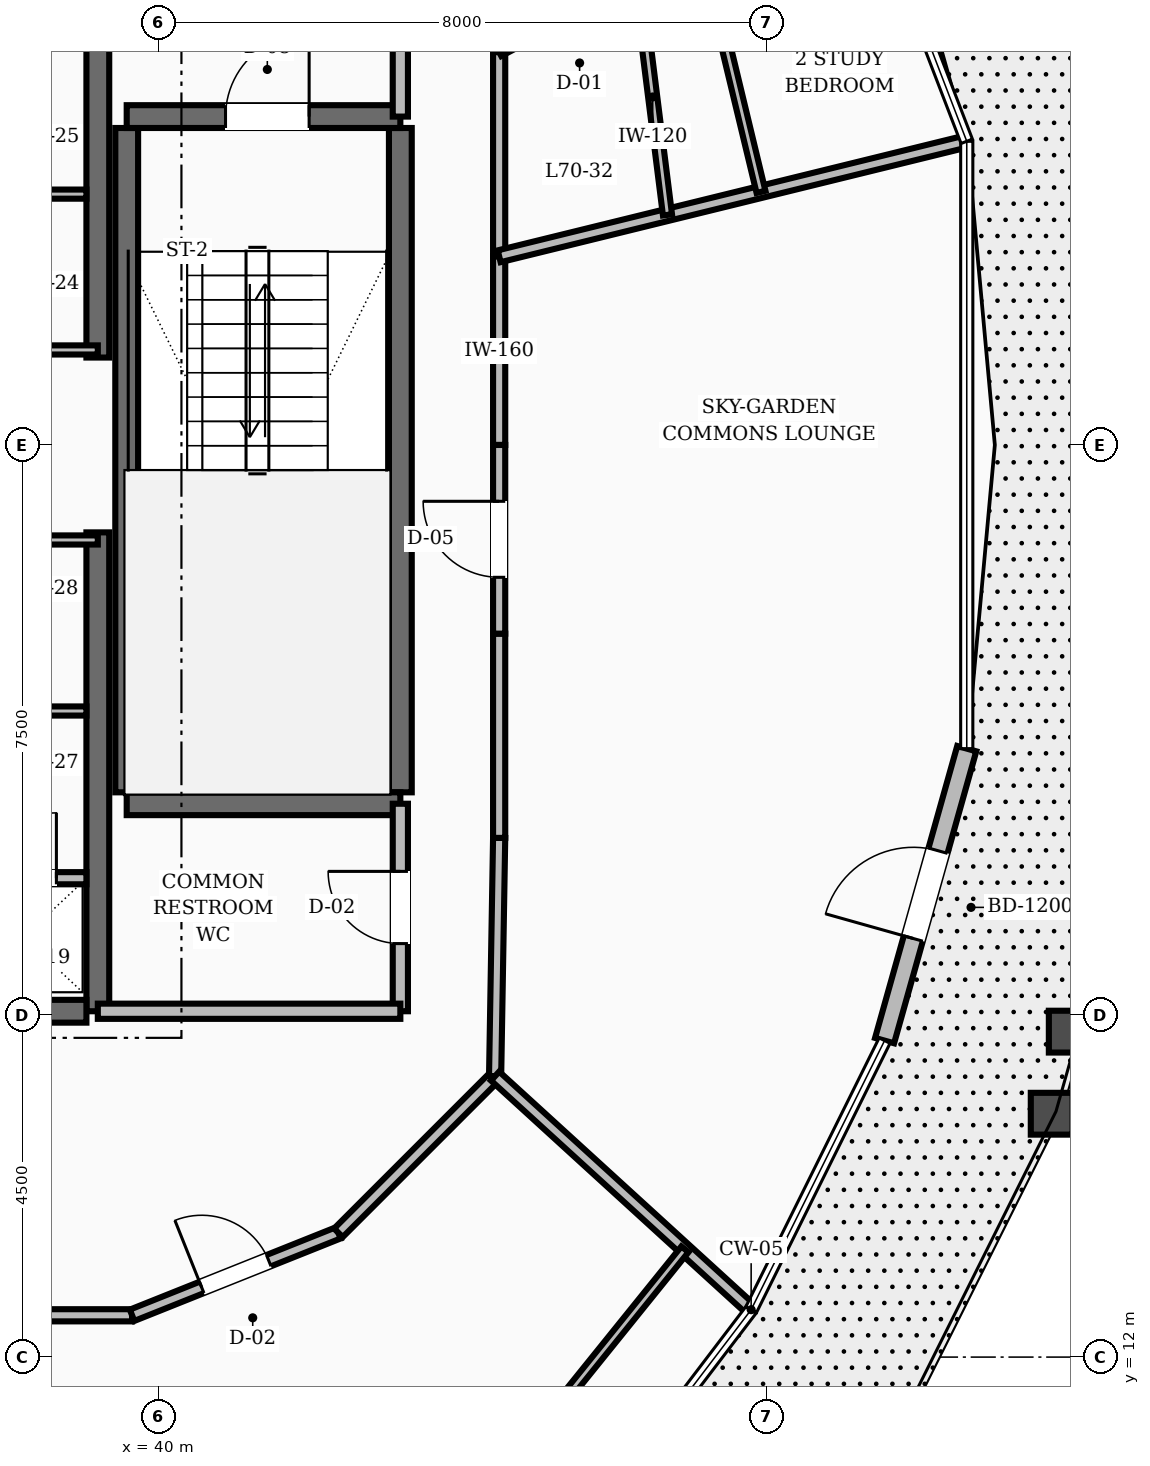
"""IFC4 building model, lengths in metres.
Left out: names, types, materials, properties, quantities, classifications, styles, units other than length and angle.
Written with IfcOpenShell. Run it as: python <this file> out.ifc"""

import sys

from ifc_helpers import new_model, si_unit, direction, frame, frame_2d, origin, place, context, subcontext, project, spatial, rectangle, extrude, element, fill, save


model = new_model("IFC4")
c1 = context("Model", 3, precision=1e-05, world=origin(), true_north=direction((0.0, 1.0)))
c2 = subcontext(c1, "Body", "Model", "MODEL_VIEW")
j1 = project(units=[si_unit("LENGTHUNIT", "METRE"), si_unit("PLANEANGLEUNIT", "RADIAN")], contexts=[c1])
p1 = place(None, origin())
s1 = spatial("IfcSite", under=j1, at=p1, CompositionType="ELEMENT")
p2 = place(p1, origin())
s2 = spatial("IfcBuilding", under=s1, at=p2, CompositionType="ELEMENT")
p3 = place(p2, frame((0.0, 0.0, 268.8)))
s3 = spatial("IfcBuildingStorey", under=s2, at=p3, CompositionType="ELEMENT", Elevation=268.8)
for number, where, z_axis, x_axis in (
    (1, (39.2, 16.55, 0.0), (0.0, 0.0, 1.0), (0.0, 1.0, 0.0)),
    (2, (39.2, 25.15, 0.0), (0.0, 0.0, 1.0), (0.0, 1.0, 0.0)),
):
    element("IfcWall", number, at=place(p3, frame(where, z_axis=z_axis, x_axis=x_axis)), inside=s3, PredefinedType="SHEAR", context=c2, shape_type="SweptSolid", body=[
        extrude(rectangle(XDim=6.3, YDim=0.3, at=frame_2d((3.15, 0.0))), origin(), (0.0, 0.0, 1.0), 3.6),
    ])
p4 = place(p3, frame((35.8, 16.55, 0.0), z_axis=(0.0, 0.0, 1.0), x_axis=(1.0, 0.0, 0.0)))
e3 = element("IfcWall", 3, at=p4, inside=s3, PredefinedType="SHEAR", context=c2, shape_type="SweptSolid", body=[
    extrude(rectangle(XDim=3.25, YDim=0.3, at=frame_2d((1.625, 0.0))), origin(), (0.0, 0.0, 1.0), 3.6),
])
p5 = place(p4, frame((0.3, 0.0, 0.0)))
e4 = element("IfcOpeningElement", 4, at=p5, cuts=e3, PredefinedType="OPENING", context=c2, shape_type="SweptSolid", body=[
    extrude(rectangle(XDim=1.1, YDim=2.1, at=frame_2d((0.55, 1.05))), frame((0.0, 0.16, 0.0), z_axis=(0.0, -1.0, 0.0), x_axis=(1.0, 0.0, 0.0)), (0.0, 0.0, 1.0), 0.32),
])
for number, where, z_axis, x_axis in (
    (5, (43.18, 19.43, 0.0), (0.0, 0.0, 1.0), (0.0, 1.0, 0.0)),
    (6, (39.58, 19.43, 0.0), (0.0, 0.0, 1.0), (0.0, 1.0, 0.0)),
):
    element("IfcWall", number, at=place(p3, frame(where, z_axis=z_axis, x_axis=x_axis)), inside=s3, PredefinedType="SHEAR", context=c2, shape_type="SweptSolid", body=[
        extrude(rectangle(XDim=8.74, YDim=0.3, at=frame_2d((4.37, 0.0))), origin(), (0.0, 0.0, 1.0), 3.6),
    ])
p6 = place(p3, frame((39.58, 19.28, 0.0), z_axis=(0.0, 0.0, 1.0), x_axis=(1.0, 0.0, 0.0)))
e7 = element("IfcWall", 7, at=p6, inside=s3, PredefinedType="SHEAR", context=c2, shape_type="SweptSolid", body=[
    extrude(rectangle(XDim=3.6, YDim=0.3, at=frame_2d((1.8, 0.0))), origin(), (0.0, 0.0, 1.0), 3.6),
])
p7 = place(p3, frame((39.58, 28.32, 0.0), z_axis=(0.0, 0.0, 1.0), x_axis=(1.0, 0.0, 0.0)))
e8 = element("IfcWall", 8, at=p7, inside=s3, PredefinedType="SHEAR", context=c2, shape_type="SweptSolid", body=[
    extrude(rectangle(XDim=3.6, YDim=0.3, at=frame_2d((1.8, 0.0))), origin(), (0.0, 0.0, 1.0), 3.6),
])
p8 = place(p7, frame((1.3, 0.0, 0.0)))
e9 = element("IfcOpeningElement", 9, at=p8, cuts=e8, PredefinedType="OPENING", context=c2, shape_type="SweptSolid", body=[
    extrude(rectangle(XDim=1.1, YDim=2.1, at=frame_2d((0.55, 1.05))), frame((0.0, 0.16, 0.0), z_axis=(0.0, -1.0, 0.0), x_axis=(1.0, 0.0, 0.0)), (0.0, 0.0, 1.0), 0.32),
])
p9 = place(p3, frame((49.551, 16.164, 0.0), z_axis=(0.0, 0.0, 1.0), x_axis=(0.270905028763, 0.962606080072, 0.0)))
e10 = element("IfcWall", 10, at=p9, inside=s3, PredefinedType="STANDARD", context=c2, shape_type="SweptSolid", body=[
    extrude(rectangle(XDim=3.99, YDim=0.26, at=frame_2d((1.995, 0.0))), origin(), (0.0, 0.0, 1.0), 2.88),
])
p10 = place(p9, frame((1.395, 0.0, 0.0)))
e11 = element("IfcOpeningElement", 11, at=p10, cuts=e10, PredefinedType="OPENING", context=c2, shape_type="SweptSolid", body=[
    extrude(rectangle(XDim=1.2, YDim=2.15, at=frame_2d((0.6, 1.075))), frame((0.0, 0.14, 0.0), z_axis=(0.0, -1.0, 0.0), x_axis=(1.0, 0.0, 0.0)), (0.0, 0.0, 1.0), 0.28),
])
p11 = place(p3, frame((43.18, 28.32, 0.0), z_axis=(0.0, 0.0, 1.0), x_axis=(0.0, 1.0, 0.0)))
e12 = element("IfcWall", 12, at=p11, inside=s3, PredefinedType="SOLIDWALL", context=c2, shape_type="SweptSolid", body=[
    extrude(rectangle(XDim=3.13, YDim=0.2, at=frame_2d((1.565, 0.0))), origin(), (0.0, 0.0, 1.0), 2.87),
])
p12 = place(p11, frame((1.015, 0.0, 0.0)))
e13 = element("IfcOpeningElement", 13, at=p12, cuts=e12, PredefinedType="OPENING", context=c2, shape_type="SweptSolid", body=[
    extrude(rectangle(XDim=1.1, YDim=2.1, at=frame_2d((0.55, 1.05))), frame((0.0, 0.11, 0.0), z_axis=(0.0, -1.0, 0.0), x_axis=(1.0, 0.0, 0.0)), (0.0, 0.0, 1.0), 0.22),
])
p13 = place(p3, frame((43.18, 16.55, 0.0), z_axis=(0.0, 0.0, 1.0), x_axis=(0.0, 1.0, 0.0)))
e14 = element("IfcWall", 14, at=p13, inside=s3, PredefinedType="SOLIDWALL", context=c2, shape_type="SweptSolid", body=[
    extrude(rectangle(XDim=2.73, YDim=0.2, at=frame_2d((1.365, 0.0))), origin(), (0.0, 0.0, 1.0), 2.87),
])
p14 = place(p13, frame((0.89, 0.0, 0.0)))
e15 = element("IfcOpeningElement", 15, at=p14, cuts=e14, PredefinedType="OPENING", context=c2, shape_type="SweptSolid", body=[
    extrude(rectangle(XDim=0.95, YDim=2.1, at=frame_2d((0.475, 1.05))), frame((0.0, 0.11, 0.0), z_axis=(0.0, -1.0, 0.0), x_axis=(1.0, 0.0, 0.0)), (0.0, 0.0, 1.0), 0.22),
])
p15 = place(p3, frame((39.2, 16.55, 0.0), z_axis=(0.0, 0.0, 1.0), x_axis=(1.0, 0.0, 0.0)))
e16 = element("IfcWall", 16, at=p15, inside=s3, PredefinedType="SOLIDWALL", context=c2, shape_type="SweptSolid", body=[
    extrude(rectangle(XDim=3.98, YDim=0.2, at=frame_2d((1.99, 0.0))), origin(), (0.0, 0.0, 1.0), 2.87),
])
p16 = place(p3, frame((37.4, 18.3, 0.0), z_axis=(0.0, 0.0, 1.0), x_axis=(1.0, 0.0, 0.0)))
e17 = element("IfcWall", 17, at=p16, inside=s3, PredefinedType="SOLIDWALL", context=c2, shape_type="SweptSolid", body=[
    extrude(rectangle(XDim=1.65, YDim=0.16, at=frame_2d((0.825, 0.0))), origin(), (0.0, 0.0, 1.0), 2.87),
])
p17 = place(p16, frame((0.395, 0.0, 0.0)))
e18 = element("IfcOpeningElement", 18, at=p17, cuts=e17, PredefinedType="OPENING", context=c2, shape_type="SweptSolid", body=[
    extrude(rectangle(XDim=0.86, YDim=2.1, at=frame_2d((0.43, 1.05))), frame((0.0, 0.09, 0.0), z_axis=(0.0, -1.0, 0.0), x_axis=(1.0, 0.0, 0.0)), (0.0, 0.0, 1.0), 0.18),
])
for number, where, z_axis, x_axis in (
    (19, (37.4, 25.25, 0.0), (0.0, 0.0, 1.0), (1.0, 0.0, 0.0)),
    (20, (37.4, 22.75, 0.0), (0.0, 0.0, 1.0), (1.0, 0.0, 0.0)),
):
    element("IfcWall", number, at=place(p3, frame(where, z_axis=z_axis, x_axis=x_axis)), inside=s3, PredefinedType="PARTITIONING", context=c2, shape_type="SweptSolid", body=[
        extrude(rectangle(XDim=1.8, YDim=0.12, at=frame_2d((0.9, 0.0))), origin(), (0.0, 0.0, 1.0), 2.87),
    ])
for number, where, z_axis, x_axis in (
    (21, (37.4, 27.3, 0.0), (0.0, 0.0, 1.0), (1.0, 0.0, 0.0)),
    (22, (37.4, 20.5, 0.0), (0.0, 0.0, 1.0), (1.0, 0.0, 0.0)),
):
    element("IfcWall", number, at=place(p3, frame(where, z_axis=z_axis, x_axis=x_axis)), inside=s3, PredefinedType="PARTITIONING", context=c2, shape_type="SweptSolid", body=[
        extrude(rectangle(XDim=1.65, YDim=0.12, at=frame_2d((0.825, 0.0))), origin(), (0.0, 0.0, 1.0), 2.87),
    ])
p18 = place(p3, frame((44.48, 24.0, 0.0), z_axis=(0.0, 0.0, 1.0), x_axis=(0.0, 1.0, 0.0)))
e23 = element("IfcWall", 23, at=p18, inside=s3, PredefinedType="SOLIDWALL", context=c2, shape_type="SweptSolid", body=[
    extrude(rectangle(XDim=2.482, YDim=0.16, at=frame_2d((1.241, 0.0))), origin(), (0.0, 0.0, 1.0), 2.87),
])
p19 = place(p3, frame((44.48, 26.482, 0.0), z_axis=(0.0, 0.0, 1.0), x_axis=(0.0, 1.0, 0.0)))
e24 = element("IfcWall", 24, at=p19, inside=s3, PredefinedType="SOLIDWALL", context=c2, shape_type="SweptSolid", body=[
    extrude(rectangle(XDim=2.687, YDim=0.16, at=frame_2d((1.344, 0.0))), origin(), (0.0, 0.0, 1.0), 2.87),
])
p20 = place(p3, frame((44.48, 29.169, 0.0), z_axis=(0.0, 0.0, 1.0), x_axis=(-0.016981035134, 0.999855811828, 0.0)))
e25 = element("IfcWall", 25, at=p20, inside=s3, PredefinedType="SOLIDWALL", context=c2, shape_type="SweptSolid", body=[
    extrude(rectangle(XDim=3.134, YDim=0.16, at=frame_2d((1.567, 0.0))), origin(), (0.0, 0.0, 1.0), 2.87),
])
p21 = place(p20, frame((1.067, 0.0, 0.0)))
e26 = element("IfcOpeningElement", 26, at=p21, cuts=e25, PredefinedType="OPENING", context=c2, shape_type="SweptSolid", body=[
    extrude(rectangle(XDim=1.0, YDim=2.1, at=frame_2d((0.5, 1.05))), frame((0.0, 0.09, 0.0), z_axis=(0.0, -1.0, 0.0), x_axis=(1.0, 0.0, 0.0)), (0.0, 0.0, 1.0), 0.18),
])
p22 = place(p3, frame((36.743, 12.55, 0.0), z_axis=(0.0, 0.0, 1.0), x_axis=(1.0, 0.0, 0.0)))
e27 = element("IfcWall", 27, at=p22, inside=s3, PredefinedType="SOLIDWALL", context=c2, shape_type="SweptSolid", body=[
    extrude(rectangle(XDim=2.908, YDim=0.16, at=frame_2d((1.454, 0.0))), origin(), (0.0, 0.0, 1.0), 2.87),
])
p23 = place(p3, frame((39.651, 12.55, 0.0), z_axis=(0.0, 0.0, 1.0), x_axis=(0.92856882165, 0.371160266542, 0.0)))
e28 = element("IfcWall", 28, at=p23, inside=s3, PredefinedType="SOLIDWALL", context=c2, shape_type="SweptSolid", body=[
    extrude(rectangle(XDim=2.923, YDim=0.16, at=frame_2d((1.461, 0.0))), origin(), (0.0, 0.0, 1.0), 2.87),
])
p24 = place(p23, frame((0.987, 0.0, 0.0)))
e29 = element("IfcOpeningElement", 29, at=p24, cuts=e28, PredefinedType="OPENING", context=c2, shape_type="SweptSolid", body=[
    extrude(rectangle(XDim=0.95, YDim=2.1, at=frame_2d((0.475, 1.05))), frame((0.0, 0.09, 0.0), z_axis=(0.0, -1.0, 0.0), x_axis=(1.0, 0.0, 0.0)), (0.0, 0.0, 1.0), 0.18),
])
p25 = place(p3, frame((42.365, 13.635, 0.0), z_axis=(0.0, 0.0, 1.0), x_axis=(0.707106781187, 0.707106781187, 0.0)))
e30 = element("IfcWall", 30, at=p25, inside=s3, PredefinedType="SOLIDWALL", context=c2, shape_type="SweptSolid", body=[
    extrude(rectangle(XDim=2.916, YDim=0.16, at=frame_2d((1.458, 0.0))), origin(), (0.0, 0.0, 1.0), 2.87),
])
p26 = place(p3, frame((44.427, 15.697, 0.0), z_axis=(0.0, 0.0, 1.0), x_axis=(0.016981035134, 0.999855811828, 0.0)))
e31 = element("IfcWall", 31, at=p26, inside=s3, PredefinedType="SOLIDWALL", context=c2, shape_type="SweptSolid", body=[
    extrude(rectangle(XDim=3.134, YDim=0.16, at=frame_2d((1.567, 0.0))), origin(), (0.0, 0.0, 1.0), 2.87),
])
p27 = place(p3, frame((44.48, 18.831, 0.0), z_axis=(0.0, 0.0, 1.0), x_axis=(0.0, 1.0, 0.0)))
e32 = element("IfcWall", 32, at=p27, inside=s3, PredefinedType="SOLIDWALL", context=c2, shape_type="SweptSolid", body=[
    extrude(rectangle(XDim=2.687, YDim=0.16, at=frame_2d((1.344, 0.0))), origin(), (0.0, 0.0, 1.0), 2.87),
])
p28 = place(p3, frame((44.48, 21.518, 0.0), z_axis=(0.0, 0.0, 1.0), x_axis=(0.0, 1.0, 0.0)))
e33 = element("IfcWall", 33, at=p28, inside=s3, PredefinedType="SOLIDWALL", context=c2, shape_type="SweptSolid", body=[
    extrude(rectangle(XDim=2.482, YDim=0.16, at=frame_2d((1.241, 0.0))), origin(), (0.0, 0.0, 1.0), 2.87),
])
p29 = place(p28, frame((0.741, 0.0, 0.0)))
e34 = element("IfcOpeningElement", 34, at=p29, cuts=e33, PredefinedType="OPENING", context=c2, shape_type="SweptSolid", body=[
    extrude(rectangle(XDim=1.0, YDim=2.1, at=frame_2d((0.5, 1.05))), frame((0.0, 0.09, 0.0), z_axis=(0.0, -1.0, 0.0), x_axis=(1.0, 0.0, 0.0)), (0.0, 0.0, 1.0), 0.18),
])
p30 = place(p3, frame((44.427, 15.697, 0.0), z_axis=(0.0, 0.0, 1.0), x_axis=(0.73873859701, -0.673992051354, 0.0)))
e35 = element("IfcWall", 35, at=p30, inside=s3, PredefinedType="SOLIDWALL", context=c2, shape_type="SweptSolid", body=[
    extrude(rectangle(XDim=4.51, YDim=0.16, at=frame_2d((2.255, 0.0))), origin(), (0.0, 0.0, 1.0), 2.87),
])
p31 = place(p3, frame((44.48, 26.482, 0.0), z_axis=(0.0, 0.0, 1.0), x_axis=(0.971083357224, 0.238740682167, 0.0)))
e36 = element("IfcWall", 36, at=p31, inside=s3, PredefinedType="SOLIDWALL", context=c2, shape_type="SweptSolid", body=[
    extrude(rectangle(XDim=6.285, YDim=0.16, at=frame_2d((3.143, 0.0))), origin(), (0.0, 0.0, 1.0), 2.87),
])
p32 = place(p3, frame((46.695, 27.027, 0.0), z_axis=(0.0, 0.0, 1.0), x_axis=(-0.124457549866, 0.99222493331, 0.0)))
e37 = element("IfcWall", 37, at=p32, inside=s3, PredefinedType="PARTITIONING", context=c2, shape_type="SweptSolid", body=[
    extrude(rectangle(XDim=3.127, YDim=0.12, at=frame_2d((1.563, 0.0))), origin(), (0.0, 0.0, 1.0), 2.87),
])
p33 = place(p3, frame((44.48, 29.169, 0.0), z_axis=(0.0, 0.0, 1.0), x_axis=(0.885077371256, 0.465443924539, 0.0)))
e38 = element("IfcWall", 38, at=p33, inside=s3, PredefinedType="PARTITIONING", context=c2, shape_type="SweptSolid", body=[
    extrude(rectangle(XDim=2.062, YDim=0.12, at=frame_2d((1.031, 0.0))), origin(), (0.0, 0.0, 1.0), 2.87),
])
p34 = place(p33, frame((0.44, 0.0, 0.0)))
e39 = element("IfcOpeningElement", 39, at=p34, cuts=e38, PredefinedType="OPENING", context=c2, shape_type="SweptSolid", body=[
    extrude(rectangle(XDim=0.86, YDim=2.1, at=frame_2d((0.43, 1.05))), frame((0.0, 0.07, 0.0), z_axis=(0.0, -1.0, 0.0), x_axis=(1.0, 0.0, 0.0)), (0.0, 0.0, 1.0), 0.14),
])
p35 = place(p3, frame((47.925, 27.329, 0.0), z_axis=(0.0, 0.0, 1.0), x_axis=(-0.234101002683, 0.972212281625, 0.0)))
e40 = element("IfcWall", 40, at=p35, inside=s3, PredefinedType="PARTITIONING", context=c2, shape_type="SweptSolid", body=[
    extrude(rectangle(XDim=6.886, YDim=0.12, at=frame_2d((3.443, 0.0))), origin(), (0.0, 0.0, 1.0), 2.87),
])
p36 = place(p35, frame((4.08, 0.0, 0.0)))
e41 = element("IfcOpeningElement", 41, at=p36, cuts=e40, PredefinedType="OPENING", context=c2, shape_type="SweptSolid", body=[
    extrude(rectangle(XDim=0.95, YDim=2.1, at=frame_2d((0.475, 1.05))), frame((0.0, 0.07, 0.0), z_axis=(0.0, -1.0, 0.0), x_axis=(1.0, 0.0, 0.0)), (0.0, 0.0, 1.0), 0.14),
])
p37 = place(p3, frame((36.743, 12.55, 0.0), z_axis=(0.0, 0.0, 1.0), x_axis=(0.320543694865, -0.947233730228, 0.0)))
e42 = element("IfcWall", 42, at=p37, inside=s3, PredefinedType="SOLIDWALL", context=c2, shape_type="SweptSolid", body=[
    extrude(rectangle(XDim=7.834, YDim=0.16, at=frame_2d((3.917, 0.0))), origin(), (0.0, 0.0, 1.0), 2.87),
])
p38 = place(p3, frame((44.639, 10.585, 0.0), z_axis=(0.0, 0.0, 1.0), x_axis=(0.627651500922, 0.77849444018, 0.0)))
e43 = element("IfcWall", 43, at=p38, inside=s3, PredefinedType="PARTITIONING", context=c2, shape_type="SweptSolid", body=[
    extrude(rectangle(XDim=3.64, YDim=0.12, at=frame_2d((1.82, 0.0))), origin(), (0.0, 0.0, 1.0), 2.87),
])
p39 = place(p10, origin())
e44 = element("IfcDoor", 44, at=p39, inside=s3, OperationType="SINGLE_SWING_LEFT", PredefinedType="DOOR", context=c2, shape_type="SweptSolid", body=[
    extrude(rectangle(XDim=1.2, YDim=2.15, at=frame_2d((0.6, 1.075))), frame((0.0, 0.025, 0.0), z_axis=(0.0, -1.0, 0.0), x_axis=(1.0, 0.0, 0.0)), (0.0, 0.0, 1.0), 0.05),
])
fill(e11, e44)
p40 = place(p8, origin())
e45 = element("IfcDoor", 45, at=p40, inside=s3, OperationType="SINGLE_SWING_RIGHT", PredefinedType="DOOR", context=c2, shape_type="SweptSolid", body=[
    extrude(rectangle(XDim=1.1, YDim=2.1, at=frame_2d((0.55, 1.05))), frame((0.0, 0.025, 0.0), z_axis=(0.0, -1.0, 0.0), x_axis=(1.0, 0.0, 0.0)), (0.0, 0.0, 1.0), 0.05),
])
fill(e9, e45)
p41 = place(p14, origin())
e46 = element("IfcDoor", 46, at=p41, inside=s3, OperationType="SINGLE_SWING_RIGHT", PredefinedType="DOOR", context=c2, shape_type="SweptSolid", body=[
    extrude(rectangle(XDim=0.95, YDim=2.1, at=frame_2d((0.475, 1.05))), frame((0.0, 0.025, 0.0), z_axis=(0.0, -1.0, 0.0), x_axis=(1.0, 0.0, 0.0)), (0.0, 0.0, 1.0), 0.05),
])
fill(e15, e46)
p42 = place(p17, origin())
e47 = element("IfcDoor", 47, at=p42, inside=s3, OperationType="SINGLE_SWING_RIGHT", PredefinedType="TRAPDOOR", context=c2, shape_type="SweptSolid", body=[
    extrude(rectangle(XDim=0.86, YDim=2.1, at=frame_2d((0.43, 1.05))), frame((0.0, 0.025, 0.0), z_axis=(0.0, -1.0, 0.0), x_axis=(1.0, 0.0, 0.0)), (0.0, 0.0, 1.0), 0.05),
])
fill(e18, e47)
p43 = place(p29, origin())
e48 = element("IfcDoor", 48, at=p43, inside=s3, OperationType="SINGLE_SWING_RIGHT", PredefinedType="DOOR", context=c2, shape_type="SweptSolid", body=[
    extrude(rectangle(XDim=1.0, YDim=2.1, at=frame_2d((0.5, 1.05))), frame((0.0, 0.025, 0.0), z_axis=(0.0, -1.0, 0.0), x_axis=(1.0, 0.0, 0.0)), (0.0, 0.0, 1.0), 0.05),
])
fill(e34, e48)
p44 = place(p24, origin())
e49 = element("IfcDoor", 49, at=p44, inside=s3, OperationType="SINGLE_SWING_LEFT", PredefinedType="DOOR", context=c2, shape_type="SweptSolid", body=[
    extrude(rectangle(XDim=0.95, YDim=2.1, at=frame_2d((0.475, 1.05))), frame((0.0, 0.025, 0.0), z_axis=(0.0, -1.0, 0.0), x_axis=(1.0, 0.0, 0.0)), (0.0, 0.0, 1.0), 0.05),
])
fill(e29, e49)
save(model, sys.argv[1])
